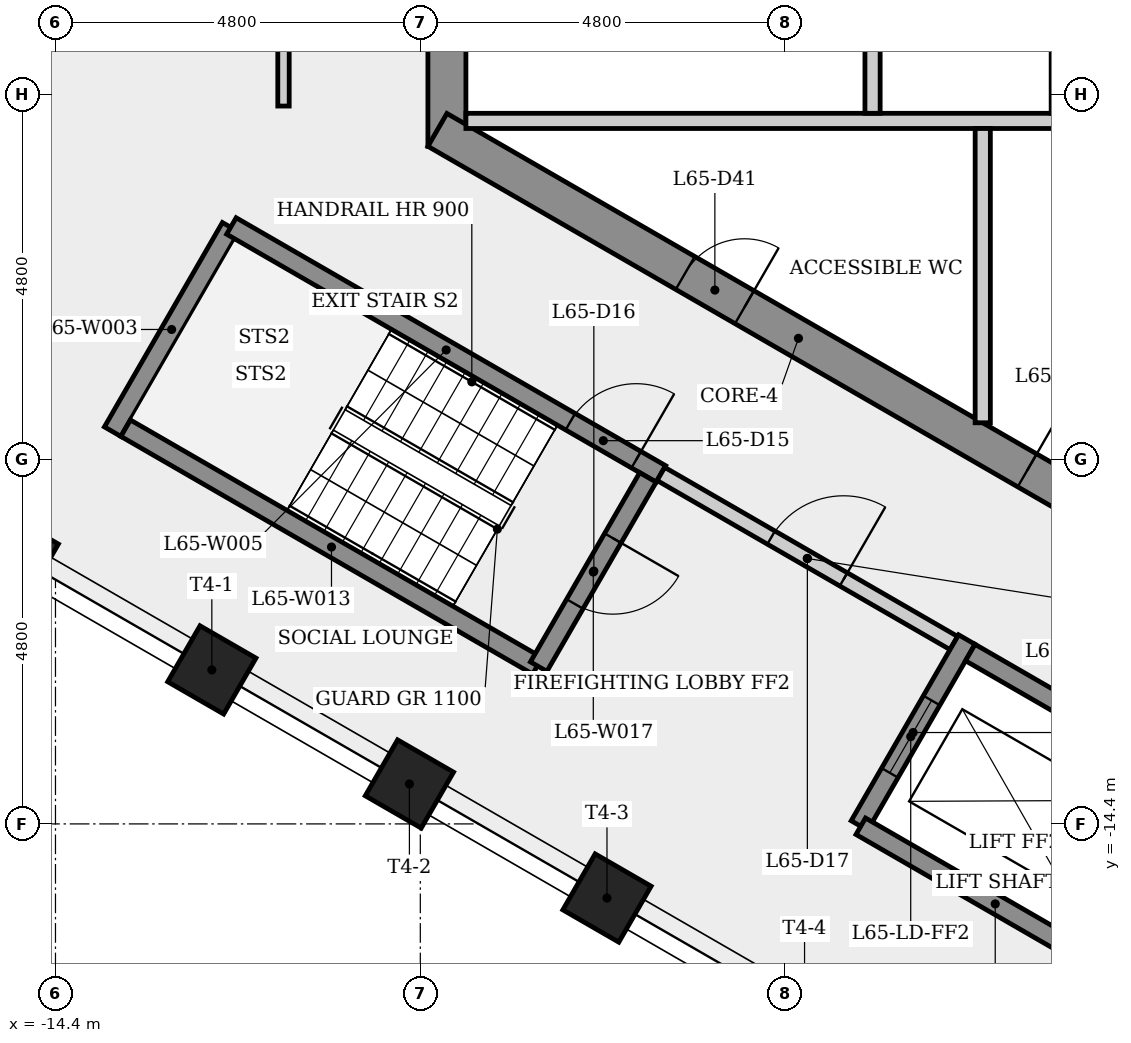
"""IFC4 building model, lengths in metres.
Left out: names, types, materials, properties, quantities, classifications, styles, units other than length and angle.
Written with IfcOpenShell. Run it as: python <this file> out.ifc"""

import sys

from ifc_helpers import new_model, si_unit, direction, frame, frame_2d, origin, origin_2d, place, context, subcontext, project, spatial, rectangle, extrude, element, fill, save


model = new_model("IFC4")
c1 = context("Model", 3, precision=1e-05, world=origin(), true_north=direction((0.0, 1.0)))
c2 = subcontext(c1, "Body", "Model", "MODEL_VIEW")
j1 = project(units=[si_unit("LENGTHUNIT", "METRE"), si_unit("PLANEANGLEUNIT", "RADIAN")], contexts=[c1])
p1 = place(None, origin())
s1 = spatial("IfcSite", under=j1, at=p1, CompositionType="ELEMENT")
p2 = place(p1, origin())
s2 = spatial("IfcBuilding", under=s1, at=p2, CompositionType="ELEMENT")
p3 = place(p2, frame((0.0, 0.0, 242.7)))
s3 = spatial("IfcBuildingStorey", under=s2, at=p3, CompositionType="ELEMENT", Elevation=242.7)
p4 = place(p3, frame((-9.25, 5.485, 0.0), z_axis=(0.0, 0.0, 1.0), x_axis=(0.0, -1.0, 0.0)))
e1 = element("IfcWall", 1, at=p4, inside=s3, PredefinedType="SHEAR", context=c2, shape_type="SweptSolid", body=[
    extrude(rectangle(XDim=10.97, YDim=0.5, at=frame_2d((5.485, 0.0))), origin(), (0.0, 0.0, 1.0), 3.4),
])
p5 = place(p4, frame((8.51, 0.0, 0.0)))
e2 = element("IfcOpeningElement", 2, at=p5, cuts=e1, PredefinedType="OPENING", context=c2, shape_type="SweptSolid", body=[
    extrude(rectangle(XDim=0.9, YDim=2.1, at=frame_2d((0.45, 1.05))), frame((0.0, 0.26, 0.0), z_axis=(0.0, -1.0, 0.0), x_axis=(1.0, 0.0, 0.0)), (0.0, 0.0, 1.0), 0.52),
])
p6 = place(p4, frame((4.685, 0.0, 0.0)))
e3 = element("IfcOpeningElement", 3, at=p6, cuts=e1, PredefinedType="OPENING", context=c2, shape_type="SweptSolid", body=[
    extrude(rectangle(XDim=1.6, YDim=2.1, at=frame_2d((0.8, 1.05))), frame((0.0, 0.26, 0.0), z_axis=(0.0, -1.0, 0.0), x_axis=(1.0, 0.0, 0.0)), (0.0, 0.0, 1.0), 0.52),
])
p7 = place(p3, frame((-9.375, -5.268, 0.0), z_axis=(0.0, 0.0, 1.0), x_axis=(0.866023993627, -0.500002442456, 0.0)))
e4 = element("IfcWall", 4, at=p7, inside=s3, PredefinedType="SHEAR", context=c2, shape_type="SweptSolid", body=[
    extrude(rectangle(XDim=10.97, YDim=0.5, at=frame_2d((5.485, 0.0))), origin(), (0.0, 0.0, 1.0), 3.4),
])
p8 = place(p7, frame((3.765, 0.0, 0.0)))
e5 = element("IfcOpeningElement", 5, at=p8, cuts=e4, PredefinedType="OPENING", context=c2, shape_type="SweptSolid", body=[
    extrude(rectangle(XDim=0.9, YDim=2.1, at=frame_2d((0.45, 1.05))), frame((0.0, 0.26, 0.0), z_axis=(0.0, -1.0, 0.0), x_axis=(1.0, 0.0, 0.0)), (0.0, 0.0, 1.0), 0.52),
])
p9 = place(p7, frame((8.96, 0.0, 0.0)))
e6 = element("IfcOpeningElement", 6, at=p9, cuts=e4, PredefinedType="OPENING", context=c2, shape_type="SweptSolid", body=[
    extrude(rectangle(XDim=0.9, YDim=2.1, at=frame_2d((0.45, 1.05))), frame((0.0, 0.26, 0.0), z_axis=(0.0, -1.0, 0.0), x_axis=(1.0, 0.0, 0.0)), (0.0, 0.0, 1.0), 0.52),
])
for number, where, z_axis, x_axis in (
    (7, (-14.942, -10.873, 0.0), (0.0, 0.0, 1.0), (-0.5, -0.866, 0.0)),
    (8, (-12.343, -12.374, 0.0), (0.0, 0.0, 1.0), (-0.5, -0.866, 0.0)),
    (9, (-9.743, -13.875, 0.0), (0.0, 0.0, 1.0), (-0.5, -0.866, 0.0)),
    (10, (-7.144, -15.375, 0.0), (0.0, 0.0, 1.0), (-0.5, -0.866, 0.0)),
):
    element("IfcColumn", number, at=place(p3, frame(where, z_axis=z_axis, x_axis=x_axis)), inside=s3, PredefinedType="COLUMN", context=c2, shape_type="SweptSolid", body=[
        extrude(rectangle(XDim=0.85, YDim=0.85, at=origin_2d()), origin(), (0.0, 0.0, 1.0), 3.4),
    ])
p10 = place(p3, frame((-13.648, -9.239, 0.0), z_axis=(0.0, 0.0, 1.0), x_axis=(0.500003782172, 0.866023220135, 0.0)))
e11 = element("IfcWall", 11, at=p10, inside=s3, PredefinedType="SHEAR", context=c2, shape_type="SweptSolid", body=[
    extrude(rectangle(XDim=3.105, YDim=0.25, at=frame_2d((1.552, 0.0))), origin(), (0.0, 0.0, 1.0), 3.05),
])
p11 = place(p3, frame((-12.085, -6.532, 0.0), z_axis=(0.0, 0.0, 1.0), x_axis=(0.866031063448, -0.499990197047, 0.0)))
e12 = element("IfcWall", 12, at=p11, inside=s3, PredefinedType="SHEAR", context=c2, shape_type="SweptSolid", body=[
    extrude(rectangle(XDim=6.525, YDim=0.25, at=frame_2d((3.263, 0.0))), origin(), (0.0, 0.0, 1.0), 3.05),
])
p12 = place(p11, frame((5.15, 0.0, 0.0)))
e13 = element("IfcOpeningElement", 13, at=p12, cuts=e12, PredefinedType="OPENING", context=c2, shape_type="SweptSolid", body=[
    extrude(rectangle(XDim=1.0, YDim=2.1, at=frame_2d((0.5, 1.05))), frame((0.0, 0.135, 0.0), z_axis=(0.0, -1.0, 0.0), x_axis=(1.0, 0.0, 0.0)), (0.0, 0.0, 1.0), 0.27),
])
p13 = place(p3, frame((-11.4, -4.955, 0.0), z_axis=(0.0, 0.0, 1.0), x_axis=(0.0, 1.0, 0.0)))
e14 = element("IfcWall", 14, at=p13, inside=s3, PredefinedType="PARTITIONING", context=c2, shape_type="SweptSolid", body=[
    extrude(rectangle(XDim=9.984, YDim=0.15, at=frame_2d((4.992, 0.0))), origin(), (0.0, 0.0, 1.0), 3.05),
])
p14 = place(p13, frame((6.106, 0.0, 0.0)))
e15 = element("IfcOpeningElement", 15, at=p14, cuts=e14, PredefinedType="OPENING", context=c2, shape_type="SweptSolid", body=[
    extrude(rectangle(XDim=1.0, YDim=2.1, at=frame_2d((0.5, 1.05))), frame((0.0, 0.085, 0.0), z_axis=(0.0, -1.0, 0.0), x_axis=(1.0, 0.0, 0.0)), (0.0, 0.0, 1.0), 0.17),
])
p15 = place(p13, frame((1.151, 0.0, 0.0)))
e16 = element("IfcOpeningElement", 16, at=p15, cuts=e14, PredefinedType="OPENING", context=c2, shape_type="SweptSolid", body=[
    extrude(rectangle(XDim=1.0, YDim=2.1, at=frame_2d((0.5, 1.05))), frame((0.0, 0.085, 0.0), z_axis=(0.0, -1.0, 0.0), x_axis=(1.0, 0.0, 0.0)), (0.0, 0.0, 1.0), 0.17),
])
p16 = place(p3, frame((-9.0, -5.15, 0.0), z_axis=(0.0, 0.0, 1.0), x_axis=(1.0, 0.0, 0.0)))
e17 = element("IfcWall", 17, at=p16, inside=s3, PredefinedType="PARTITIONING", context=c2, shape_type="SweptSolid", body=[
    extrude(rectangle(XDim=11.325, YDim=0.2, at=frame_2d((5.663, 0.0))), origin(), (0.0, 0.0, 1.0), 3.05),
])
p17 = place(p3, frame((-8.06, -12.321, 0.0), z_axis=(0.0, 0.0, 1.0), x_axis=(-0.866029591389, 0.499992746786, 0.0)))
e18 = element("IfcWall", 18, at=p17, inside=s3, PredefinedType="SHEAR", context=c2, shape_type="SweptSolid", body=[
    extrude(rectangle(XDim=6.255, YDim=0.25, at=frame_2d((3.127, 0.0))), origin(), (0.0, 0.0, 1.0), 3.05),
])
p18 = place(p3, frame((-6.605, -9.841, 0.0), z_axis=(0.0, 0.0, 1.0), x_axis=(-0.500011588718, -0.866018712932, 0.0)))
e19 = element("IfcWall", 19, at=p18, inside=s3, PredefinedType="SHEAR", context=c2, shape_type="SweptSolid", body=[
    extrude(rectangle(XDim=2.875, YDim=0.25, at=frame_2d((1.438, 0.0))), origin(), (0.0, 0.0, 1.0), 3.05),
])
p19 = place(p18, frame((0.923, 0.0, 0.0)))
e20 = element("IfcOpeningElement", 20, at=p19, cuts=e19, PredefinedType="OPENING", context=c2, shape_type="SweptSolid", body=[
    extrude(rectangle(XDim=1.0, YDim=2.1, at=frame_2d((0.5, 1.05))), frame((0.0, 0.135, 0.0), z_axis=(0.0, -1.0, 0.0), x_axis=(1.0, 0.0, 0.0)), (0.0, 0.0, 1.0), 0.27),
])
p20 = place(p3, frame((-6.435, -9.795, 0.0), z_axis=(0.0, 0.0, 1.0), x_axis=(0.866012907634, -0.500021643343, 0.0)))
e21 = element("IfcWall", 21, at=p20, inside=s3, PredefinedType="PARTITIONING", context=c2, shape_type="SweptSolid", body=[
    extrude(rectangle(XDim=4.45, YDim=0.2, at=frame_2d((2.225, 0.0))), origin(), (0.0, 0.0, 1.0), 3.05),
])
p21 = place(p20, frame((1.675, 0.0, 0.0)))
e22 = element("IfcOpeningElement", 22, at=p21, cuts=e21, PredefinedType="OPENING", context=c2, shape_type="SweptSolid", body=[
    extrude(rectangle(XDim=1.1, YDim=2.1, at=frame_2d((0.55, 1.05))), frame((0.0, 0.11, 0.0), z_axis=(0.0, -1.0, 0.0), x_axis=(1.0, 0.0, 0.0)), (0.0, 0.0, 1.0), 0.22),
])
p22 = place(p3, frame((-3.65, -1.9, 0.0), z_axis=(0.0, 0.0, 1.0), x_axis=(0.0, -1.0, 0.0)))
e23 = element("IfcWall", 23, at=p22, inside=s3, PredefinedType="PARTITIONING", context=c2, shape_type="SweptSolid", body=[
    extrude(rectangle(XDim=3.15, YDim=0.2, at=frame_2d((1.575, 0.0))), origin(), (0.0, 0.0, 1.0), 3.05),
])
p23 = place(p3, frame((-2.41, -11.974, 0.0), z_axis=(0.0, 0.0, 1.0), x_axis=(-0.49998675294, -0.866033051843, 0.0)))
e24 = element("IfcWall", 24, at=p23, inside=s3, PredefinedType="SHEAR", context=c2, shape_type="SweptSolid", body=[
    extrude(rectangle(XDim=2.825, YDim=0.25, at=frame_2d((1.413, 0.0))), origin(), (0.0, 0.0, 1.0), 3.05),
])
p24 = place(p23, frame((0.926, 0.0, 0.0)))
e25 = element("IfcOpeningElement", 25, at=p24, cuts=e24, PredefinedType="OPENING", context=c2, shape_type="SweptSolid", body=[
    extrude(rectangle(XDim=1.1, YDim=2.1, at=frame_2d((0.55, 1.05))), frame((0.0, 0.135, 0.0), z_axis=(0.0, -1.0, 0.0), x_axis=(1.0, 0.0, 0.0)), (0.0, 0.0, 1.0), 0.27),
])
p25 = place(p3, frame((-2.364, -12.145, 0.0), z_axis=(0.0, 0.0, 1.0), x_axis=(0.866048579423, -0.499959856469, 0.0)))
e26 = element("IfcWall", 26, at=p25, inside=s3, PredefinedType="SHEAR", context=c2, shape_type="SweptSolid", body=[
    extrude(rectangle(XDim=3.175, YDim=0.25, at=frame_2d((1.587, 0.0))), origin(), (0.0, 0.0, 1.0), 3.4),
])
p26 = place(p3, frame((-2.2, -5.25, 0.0), z_axis=(0.0, 0.0, 1.0), x_axis=(0.0, -1.0, 0.0)))
e27 = element("IfcWall", 27, at=p26, inside=s3, PredefinedType="PARTITIONING", context=c2, shape_type="SweptSolid", body=[
    extrude(rectangle(XDim=3.872, YDim=0.2, at=frame_2d((1.936, 0.0))), origin(), (0.0, 0.0, 1.0), 3.05),
])
p27 = place(p3, frame((-0.856, -16.133, 0.0), z_axis=(0.0, 0.0, 1.0), x_axis=(-0.866032748241, 0.499987278812, 0.0)))
e28 = element("IfcWall", 28, at=p27, inside=s3, PredefinedType="SHEAR", context=c2, shape_type="SweptSolid", body=[
    extrude(rectangle(XDim=3.405, YDim=0.25, at=frame_2d((1.702, 0.0))), origin(), (0.0, 0.0, 1.0), 3.05),
])
p28 = place(p12, origin())
e29 = element("IfcDoor", 29, at=p28, inside=s3, OperationType="SINGLE_SWING_RIGHT", PredefinedType="DOOR", context=c2, shape_type="SweptSolid", body=[
    extrude(rectangle(XDim=1.0, YDim=2.1, at=frame_2d((0.5, 1.05))), frame((0.0, 0.025, 0.0), z_axis=(0.0, -1.0, 0.0), x_axis=(1.0, 0.0, 0.0)), (0.0, 0.0, 1.0), 0.05),
])
fill(e13, e29)
p29 = place(p19, origin())
e30 = element("IfcDoor", 30, at=p29, inside=s3, OperationType="SINGLE_SWING_LEFT", PredefinedType="DOOR", context=c2, shape_type="SweptSolid", body=[
    extrude(rectangle(XDim=1.0, YDim=2.1, at=frame_2d((0.5, 1.05))), frame((0.0, 0.025, 0.0), z_axis=(0.0, -1.0, 0.0), x_axis=(1.0, 0.0, 0.0)), (0.0, 0.0, 1.0), 0.05),
])
fill(e20, e30)
p30 = place(p21, origin())
e31 = element("IfcDoor", 31, at=p30, inside=s3, OperationType="SINGLE_SWING_RIGHT", PredefinedType="DOOR", context=c2, shape_type="SweptSolid", body=[
    extrude(rectangle(XDim=1.1, YDim=2.1, at=frame_2d((0.55, 1.05))), frame((0.0, 0.025, 0.0), z_axis=(0.0, -1.0, 0.0), x_axis=(1.0, 0.0, 0.0)), (0.0, 0.0, 1.0), 0.05),
])
fill(e22, e31)
p31 = place(p24, origin())
e32 = element("IfcDoor", 32, at=p31, inside=s3, OperationType="SLIDING_TO_LEFT", PredefinedType="DOOR", context=c2, shape_type="SweptSolid", body=[
    extrude(rectangle(XDim=1.1, YDim=2.1, at=frame_2d((0.55, 1.05))), frame((0.0, 0.025, 0.0), z_axis=(0.0, -1.0, 0.0), x_axis=(1.0, 0.0, 0.0)), (0.0, 0.0, 1.0), 0.05),
])
fill(e25, e32)
p32 = place(p8, origin())
e33 = element("IfcDoor", 33, at=p32, inside=s3, OperationType="SINGLE_SWING_RIGHT", PredefinedType="DOOR", context=c2, shape_type="SweptSolid", body=[
    extrude(rectangle(XDim=0.9, YDim=2.1, at=frame_2d((0.45, 1.05))), frame((0.0, 0.025, 0.0), z_axis=(0.0, -1.0, 0.0), x_axis=(1.0, 0.0, 0.0)), (0.0, 0.0, 1.0), 0.05),
])
fill(e5, e33)
p33 = place(p9, origin())
e34 = element("IfcDoor", 34, at=p33, inside=s3, OperationType="SINGLE_SWING_LEFT", PredefinedType="DOOR", context=c2, shape_type="SweptSolid", body=[
    extrude(rectangle(XDim=0.9, YDim=2.1, at=frame_2d((0.45, 1.05))), frame((0.0, 0.025, 0.0), z_axis=(0.0, -1.0, 0.0), x_axis=(1.0, 0.0, 0.0)), (0.0, 0.0, 1.0), 0.05),
])
fill(e6, e34)
save(model, sys.argv[1])
